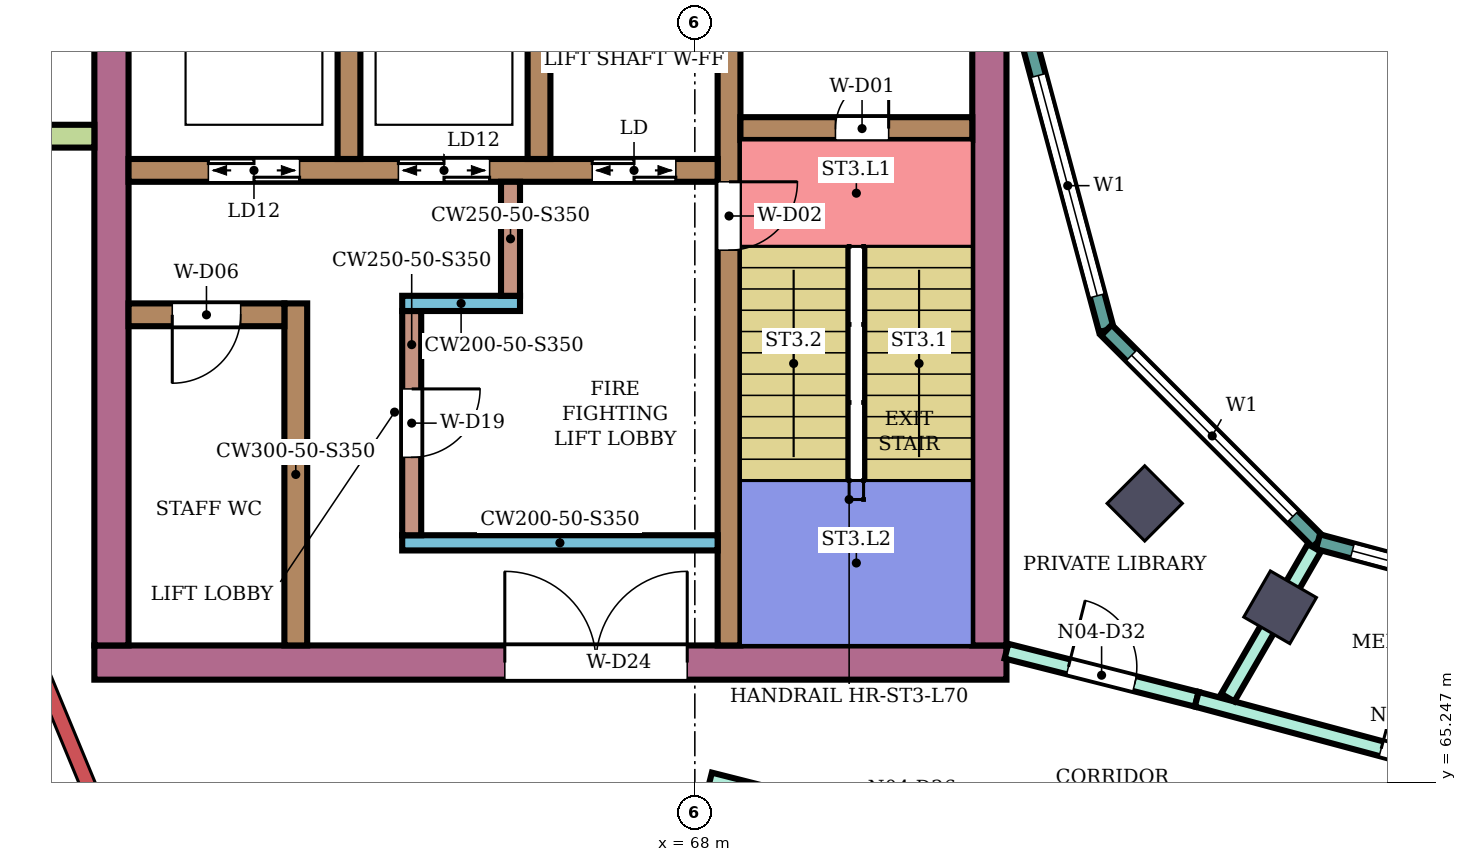
"""IFC4 building model, lengths in metres.
Left out: names, types, materials, properties, quantities, classifications, styles, units other than length and angle.
Written with IfcOpenShell. Run it as: python <this file> out.ifc"""

import sys

from ifc_helpers import new_model, si_unit, direction, frame, frame_2d, origin, origin_2d, place, context, subcontext, project, spatial, rectangle, extrude, element, fill, save


model = new_model("IFC4")
c1 = context("Model", 3, precision=1e-05, world=origin(), true_north=direction((0.0, 1.0)))
c2 = subcontext(c1, "Body", "Model", "MODEL_VIEW")
j1 = project(units=[si_unit("LENGTHUNIT", "METRE"), si_unit("PLANEANGLEUNIT", "RADIAN")], contexts=[c1])
p1 = place(None, origin())
s1 = spatial("IfcSite", under=j1, at=p1, CompositionType="ELEMENT")
p2 = place(p1, origin())
s2 = spatial("IfcBuilding", under=s1, at=p2, CompositionType="ELEMENT")
p3 = place(p2, frame((0.0, 0.0, 305.1)))
s3 = spatial("IfcBuildingStorey", under=s2, at=p3, CompositionType="ELEMENT", Elevation=305.1)
for number, where, z_axis, x_axis in (
    (1, (73.919, 68.919, 0.0), (0.0, 0.0, 1.0), (-0.707, -0.707, 0.0)),
    (2, (75.7, 67.552, 0.0), (0.0, 0.0, 1.0), (-0.5, -0.866, 0.0)),
):
    element("IfcColumn", number, at=place(p3, frame(where, z_axis=z_axis, x_axis=x_axis)), inside=s3, PredefinedType="COLUMN", context=c2, shape_type="SweptSolid", body=[
        extrude(rectangle(XDim=0.7, YDim=0.7, at=origin_2d()), origin(), (0.0, 0.0, 1.0), 4.2),
    ])
p4 = place(p3, frame((72.1, 66.825, 0.0), z_axis=(0.0, 0.0, 1.0), x_axis=(-1.0, 0.0, 0.0)))
e3 = element("IfcWall", 3, at=p4, inside=s3, PredefinedType="SHEAR", context=c2, shape_type="SweptSolid", body=[
    extrude(rectangle(XDim=12.0, YDim=0.45, at=frame_2d((6.0, 0.0))), origin(), (0.0, 0.0, 1.0), 3.85),
])
p5 = place(p4, frame((4.2, 0.0, 0.0)))
e4 = element("IfcOpeningElement", 4, at=p5, cuts=e3, PredefinedType="OPENING", context=c2, shape_type="SweptSolid", body=[
    extrude(rectangle(XDim=2.4, YDim=2.4, at=frame_2d((1.2, 1.2))), frame((0.0, 0.235, 0.0), z_axis=(0.0, -1.0, 0.0), x_axis=(1.0, 0.0, 0.0)), (0.0, 0.0, 1.0), 0.47),
])
p6 = place(p3, frame((71.875, 75.0, 0.0), z_axis=(0.0, 0.0, 1.0), x_axis=(0.0, -1.0, 0.0)))
e5 = element("IfcWall", 5, at=p6, inside=s3, PredefinedType="SHEAR", context=c2, shape_type="SweptSolid", body=[
    extrude(rectangle(XDim=7.95, YDim=0.45, at=frame_2d((3.975, 0.0))), origin(), (0.0, 0.0, 1.0), 3.85),
])
p7 = place(p3, frame((60.325, 76.4, 0.0), z_axis=(0.0, 0.0, 1.0), x_axis=(0.0, -1.0, 0.0)))
e6 = element("IfcWall", 6, at=p7, inside=s3, PredefinedType="SHEAR", context=c2, shape_type="SweptSolid", body=[
    extrude(rectangle(XDim=9.35, YDim=0.45, at=frame_2d((4.675, 0.0))), origin(), (0.0, 0.0, 1.0), 3.85),
])
p8 = place(p3, frame((68.45, 75.0, 0.0), z_axis=(0.0, 0.0, 1.0), x_axis=(0.0, -1.0, 0.0)))
e7 = element("IfcWall", 7, at=p8, inside=s3, PredefinedType="SHEAR", context=c2, shape_type="SweptSolid", body=[
    extrude(rectangle(XDim=7.95, YDim=0.3, at=frame_2d((3.975, 0.0))), origin(), (0.0, 0.0, 1.0), 3.85),
])
p9 = place(p8, frame((1.85, 0.0, 0.0)))
e8 = element("IfcOpeningElement", 8, at=p9, cuts=e7, PredefinedType="OPENING", context=c2, shape_type="SweptSolid", body=[
    extrude(rectangle(XDim=0.9, YDim=2.1, at=frame_2d((0.45, 1.05))), frame((0.0, 0.16, 0.0), z_axis=(0.0, -1.0, 0.0), x_axis=(1.0, 0.0, 0.0)), (0.0, 0.0, 1.0), 0.32),
])
p10 = place(p3, frame((71.65, 73.85, 0.0), z_axis=(0.0, 0.0, 1.0), x_axis=(-1.0, 0.0, 0.0)))
e9 = element("IfcWall", 9, at=p10, inside=s3, PredefinedType="SHEAR", context=c2, shape_type="SweptSolid", body=[
    extrude(rectangle(XDim=3.05, YDim=0.3, at=frame_2d((1.525, 0.0))), origin(), (0.0, 0.0, 1.0), 3.85),
])
p11 = place(p10, frame((1.1, 0.0, 0.0)))
e10 = element("IfcOpeningElement", 10, at=p11, cuts=e9, PredefinedType="OPENING", context=c2, shape_type="SweptSolid", body=[
    extrude(rectangle(XDim=0.7, YDim=2.0, at=frame_2d((0.35, 1.0))), frame((0.0, 0.16, 0.0), z_axis=(0.0, -1.0, 0.0), x_axis=(1.0, 0.0, 0.0)), (0.0, 0.0, 1.0), 0.32),
])
p12 = place(p3, frame((68.3, 73.3, 0.0), z_axis=(0.0, 0.0, 1.0), x_axis=(-1.0, 0.0, 0.0)))
e11 = element("IfcWall", 11, at=p12, inside=s3, PredefinedType="SHEAR", context=c2, shape_type="SweptSolid", body=[
    extrude(rectangle(XDim=7.75, YDim=0.3, at=frame_2d((3.875, 0.0))), origin(), (0.0, 0.0, 1.0), 3.85),
])
p13 = place(p12, frame((0.55, 0.0, 0.0)))
e12 = element("IfcOpeningElement", 12, at=p13, cuts=e11, PredefinedType="OPENING", context=c2, shape_type="SweptSolid", body=[
    extrude(rectangle(XDim=1.1, YDim=2.1, at=frame_2d((0.55, 1.05))), frame((0.0, 0.16, 0.0), z_axis=(0.0, -1.0, 0.0), x_axis=(1.0, 0.0, 0.0)), (0.0, 0.0, 1.0), 0.32),
])
p14 = place(p12, frame((3.0, 0.0, 0.0)))
e13 = element("IfcOpeningElement", 13, at=p14, cuts=e11, PredefinedType="OPENING", context=c2, shape_type="SweptSolid", body=[
    extrude(rectangle(XDim=1.2, YDim=2.1, at=frame_2d((0.6, 1.05))), frame((0.0, 0.16, 0.0), z_axis=(0.0, -1.0, 0.0), x_axis=(1.0, 0.0, 0.0)), (0.0, 0.0, 1.0), 0.32),
])
p15 = place(p12, frame((5.5, 0.0, 0.0)))
e14 = element("IfcOpeningElement", 14, at=p15, cuts=e11, PredefinedType="OPENING", context=c2, shape_type="SweptSolid", body=[
    extrude(rectangle(XDim=1.2, YDim=2.1, at=frame_2d((0.6, 1.05))), frame((0.0, 0.16, 0.0), z_axis=(0.0, -1.0, 0.0), x_axis=(1.0, 0.0, 0.0)), (0.0, 0.0, 1.0), 0.32),
])
for number, where, z_axis, x_axis in (
    (15, (65.95, 76.0, 0.0), (0.0, 0.0, 1.0), (0.0, -1.0, 0.0)),
    (16, (63.45, 76.0, 0.0), (0.0, 0.0, 1.0), (0.0, -1.0, 0.0)),
):
    element("IfcWall", number, at=place(p3, frame(where, z_axis=z_axis, x_axis=x_axis)), inside=s3, PredefinedType="SHEAR", context=c2, shape_type="SweptSolid", body=[
        extrude(rectangle(XDim=2.55, YDim=0.3, at=frame_2d((1.275, 0.0))), origin(), (0.0, 0.0, 1.0), 3.85),
    ])
p16 = place(p3, frame((68.3, 68.4, 0.0), z_axis=(0.0, 0.0, 1.0), x_axis=(-1.0, 0.0, 0.0)))
e17 = element("IfcWall", 17, at=p16, inside=s3, PredefinedType="SHEAR", context=c2, shape_type="SweptSolid", body=[
    extrude(rectangle(XDim=4.15, YDim=0.2, at=frame_2d((2.075, 0.0))), origin(), (0.0, 0.0, 1.0), 3.85),
])
p17 = place(p3, frame((64.275, 71.45, 0.0), z_axis=(0.0, 0.0, 1.0), x_axis=(0.0, -1.0, 0.0)))
e18 = element("IfcWall", 18, at=p17, inside=s3, PredefinedType="SHEAR", context=c2, shape_type="SweptSolid", body=[
    extrude(rectangle(XDim=2.95, YDim=0.25, at=frame_2d((1.475, 0.0))), origin(), (0.0, 0.0, 1.0), 3.85),
])
p18 = place(p17, frame((1.025, 0.0, 0.0)))
e19 = element("IfcOpeningElement", 19, at=p18, cuts=e18, PredefinedType="OPENING", context=c2, shape_type="SweptSolid", body=[
    extrude(rectangle(XDim=0.9, YDim=2.1, at=frame_2d((0.45, 1.05))), frame((0.0, 0.135, 0.0), z_axis=(0.0, -1.0, 0.0), x_axis=(1.0, 0.0, 0.0)), (0.0, 0.0, 1.0), 0.27),
])
p19 = place(p3, frame((65.7, 71.55, 0.0), z_axis=(0.0, 0.0, 1.0), x_axis=(-1.0, 0.0, 0.0)))
e20 = element("IfcWall", 20, at=p19, inside=s3, PredefinedType="SHEAR", context=c2, shape_type="SweptSolid", body=[
    extrude(rectangle(XDim=1.55, YDim=0.2, at=frame_2d((0.775, 0.0))), origin(), (0.0, 0.0, 1.0), 3.85),
])
p20 = place(p3, frame((65.575, 73.15, 0.0), z_axis=(0.0, 0.0, 1.0), x_axis=(0.0, -1.0, 0.0)))
e21 = element("IfcWall", 21, at=p20, inside=s3, PredefinedType="SHEAR", context=c2, shape_type="SweptSolid", body=[
    extrude(rectangle(XDim=1.5, YDim=0.25, at=frame_2d((0.75, 0.0))), origin(), (0.0, 0.0, 1.0), 3.85),
])
p21 = place(p3, frame((62.75, 71.55, 0.0), z_axis=(0.0, 0.0, 1.0), x_axis=(0.0, -1.0, 0.0)))
e22 = element("IfcWall", 22, at=p21, inside=s3, PredefinedType="SHEAR", context=c2, shape_type="SweptSolid", body=[
    extrude(rectangle(XDim=4.5, YDim=0.3, at=frame_2d((2.25, 0.0))), origin(), (0.0, 0.0, 1.0), 3.85),
])
p22 = place(p3, frame((62.6, 71.4, 0.0), z_axis=(0.0, 0.0, 1.0), x_axis=(-1.0, 0.0, 0.0)))
e23 = element("IfcWall", 23, at=p22, inside=s3, PredefinedType="SHEAR", context=c2, shape_type="SweptSolid", body=[
    extrude(rectangle(XDim=2.05, YDim=0.3, at=frame_2d((1.025, 0.0))), origin(), (0.0, 0.0, 1.0), 3.85),
])
p23 = place(p22, frame((0.575, 0.0, 0.0)))
e24 = element("IfcOpeningElement", 24, at=p23, cuts=e23, PredefinedType="OPENING", context=c2, shape_type="SweptSolid", body=[
    extrude(rectangle(XDim=0.9, YDim=2.1, at=frame_2d((0.45, 1.05))), frame((0.0, 0.16, 0.0), z_axis=(0.0, -1.0, 0.0), x_axis=(1.0, 0.0, 0.0)), (0.0, 0.0, 1.0), 0.32),
])
p24 = place(p3, frame((60.1, 73.75, 0.0), z_axis=(0.0, 0.0, 1.0), x_axis=(-1.0, 0.0, 0.0)))
e25 = element("IfcWall", 25, at=p24, inside=s3, PredefinedType="NOTDEFINED", context=c2, shape_type="SweptSolid", body=[
    extrude(rectangle(XDim=2.416, YDim=0.3, at=frame_2d((1.208, 0.0))), origin(), (0.0, 0.0, 1.0), 4.2),
])
p25 = place(p3, frame((72.396, 75.0, 0.0), z_axis=(0.0, 0.0, 1.0), x_axis=(0.258789828301, -0.965933654434, 0.0)))
e26 = element("IfcWall", 26, at=p25, inside=s3, PredefinedType="NOTDEFINED", context=c2, shape_type="SweptSolid", body=[
    extrude(rectangle(XDim=3.936, YDim=0.2, at=frame_2d((1.968, 0.0))), origin(), (0.0, 0.0, 1.0), 4.2),
])
p26 = place(p25, frame((0.468, 0.0, 0.9)))
e27 = element("IfcOpeningElement", 27, at=p26, cuts=e26, PredefinedType="OPENING", context=c2, shape_type="SweptSolid", body=[
    extrude(rectangle(XDim=3.0, YDim=2.3, at=frame_2d((1.5, 1.15))), frame((0.0, 0.11, 0.0), z_axis=(0.0, -1.0, 0.0), x_axis=(1.0, 0.0, 0.0)), (0.0, 0.0, 1.0), 0.22),
])
p27 = place(p3, frame((73.415, 71.198, 0.0), z_axis=(0.0, 0.0, 1.0), x_axis=(0.707106781187, -0.707106781187, 0.0)))
e28 = element("IfcWall", 28, at=p27, inside=s3, PredefinedType="NOTDEFINED", context=c2, shape_type="SweptSolid", body=[
    extrude(rectangle(XDim=3.936, YDim=0.2, at=frame_2d((1.968, 0.0))), origin(), (0.0, 0.0, 1.0), 4.2),
])
p28 = place(p27, frame((0.468, 0.0, 0.9)))
e29 = element("IfcOpeningElement", 29, at=p28, cuts=e28, PredefinedType="OPENING", context=c2, shape_type="SweptSolid", body=[
    extrude(rectangle(XDim=3.0, YDim=2.3, at=frame_2d((1.5, 1.15))), frame((0.0, 0.11, 0.0), z_axis=(0.0, -1.0, 0.0), x_axis=(1.0, 0.0, 0.0)), (0.0, 0.0, 1.0), 0.22),
])
p29 = place(p3, frame((76.198, 68.415, 0.0), z_axis=(0.0, 0.0, 1.0), x_axis=(0.965933654434, -0.258789828301, 0.0)))
e30 = element("IfcWall", 30, at=p29, inside=s3, PredefinedType="NOTDEFINED", context=c2, shape_type="SweptSolid", body=[
    extrude(rectangle(XDim=3.936, YDim=0.2, at=frame_2d((1.968, 0.0))), origin(), (0.0, 0.0, 1.0), 4.2),
])
p30 = place(p29, frame((0.468, 0.0, 0.9)))
e31 = element("IfcOpeningElement", 31, at=p30, cuts=e30, PredefinedType="OPENING", context=c2, shape_type="SweptSolid", body=[
    extrude(rectangle(XDim=3.0, YDim=2.3, at=frame_2d((1.5, 1.15))), frame((0.0, 0.11, 0.0), z_axis=(0.0, -1.0, 0.0), x_axis=(1.0, 0.0, 0.0)), (0.0, 0.0, 1.0), 0.22),
])
p31 = place(p3, frame((68.2, 65.28, 0.0), z_axis=(0.0, 0.0, 1.0), x_axis=(0.969450596516, -0.245286650503, 0.0)))
e32 = element("IfcWall", 32, at=p31, inside=s3, PredefinedType="PARTITIONING", context=c2, shape_type="SweptSolid", body=[
    extrude(rectangle(XDim=5.928, YDim=0.2, at=frame_2d((2.964, 0.0))), origin(), (0.0, 0.0, 1.0), 3.75),
])
p32 = place(p31, frame((2.24, 0.0, 0.0)))
e33 = element("IfcOpeningElement", 33, at=p32, cuts=e32, PredefinedType="OPENING", context=c2, shape_type="SweptSolid", body=[
    extrude(rectangle(XDim=1.0, YDim=2.1, at=frame_2d((0.5, 1.05))), frame((0.0, 0.11, 0.0), z_axis=(0.0, -1.0, 0.0), x_axis=(1.0, 0.0, 0.0)), (0.0, 0.0, 1.0), 0.22),
])
p33 = place(p3, frame((72.1, 66.975, 0.0), z_axis=(0.0, 0.0, 1.0), x_axis=(0.969471314457, -0.245204752086, 0.0)))
e34 = element("IfcWall", 34, at=p33, inside=s3, PredefinedType="PARTITIONING", context=c2, shape_type="SweptSolid", body=[
    extrude(rectangle(XDim=2.582, YDim=0.2, at=frame_2d((1.291, 0.0))), origin(), (0.0, 0.0, 1.0), 3.75),
])
p34 = place(p33, frame((0.841, 0.0, 0.0)))
e35 = element("IfcOpeningElement", 35, at=p34, cuts=e34, PredefinedType="OPENING", context=c2, shape_type="SweptSolid", body=[
    extrude(rectangle(XDim=0.9, YDim=2.1, at=frame_2d((0.45, 1.05))), frame((0.0, 0.11, 0.0), z_axis=(0.0, -1.0, 0.0), x_axis=(1.0, 0.0, 0.0)), (0.0, 0.0, 1.0), 0.22),
])
p35 = place(p3, frame((74.603, 66.342, 0.0), z_axis=(0.0, 0.0, 1.0), x_axis=(0.965920893652, -0.258837453254, 0.0)))
e36 = element("IfcWall", 36, at=p35, inside=s3, PredefinedType="PARTITIONING", context=c2, shape_type="SweptSolid", body=[
    extrude(rectangle(XDim=5.458, YDim=0.2, at=frame_2d((2.729, 0.0))), origin(), (0.0, 0.0, 1.0), 3.75),
])
p36 = place(p35, frame((2.512, 0.0, 0.0)))
e37 = element("IfcOpeningElement", 37, at=p36, cuts=e36, PredefinedType="OPENING", context=c2, shape_type="SweptSolid", body=[
    extrude(rectangle(XDim=0.9, YDim=2.1, at=frame_2d((0.45, 1.05))), frame((0.0, 0.11, 0.0), z_axis=(0.0, -1.0, 0.0), x_axis=(1.0, 0.0, 0.0)), (0.0, 0.0, 1.0), 0.22),
])
p37 = place(p3, frame((75.012, 66.363, 0.0), z_axis=(0.0, 0.0, 1.0), x_axis=(0.500223967704, 0.86589605735, 0.0)))
e38 = element("IfcWall", 38, at=p37, inside=s3, PredefinedType="PARTITIONING", context=c2, shape_type="SweptSolid", body=[
    extrude(rectangle(XDim=2.275, YDim=0.2, at=frame_2d((1.138, 0.0))), origin(), (0.0, 0.0, 1.0), 3.75),
])
p38 = place(p26, origin())
e39 = element("IfcWindow", 39, at=p38, inside=s3, PartitioningType="SINGLE_PANEL", PredefinedType="WINDOW", context=c2, shape_type="SweptSolid", body=[
    extrude(rectangle(XDim=3.0, YDim=2.3, at=frame_2d((1.5, 1.15))), frame((0.0, 0.03, 0.0), z_axis=(0.0, -1.0, 0.0), x_axis=(1.0, 0.0, 0.0)), (0.0, 0.0, 1.0), 0.06),
])
fill(e27, e39)
p39 = place(p28, origin())
e40 = element("IfcWindow", 40, at=p39, inside=s3, PartitioningType="SINGLE_PANEL", PredefinedType="WINDOW", context=c2, shape_type="SweptSolid", body=[
    extrude(rectangle(XDim=3.0, YDim=2.3, at=frame_2d((1.5, 1.15))), frame((0.0, 0.03, 0.0), z_axis=(0.0, -1.0, 0.0), x_axis=(1.0, 0.0, 0.0)), (0.0, 0.0, 1.0), 0.06),
])
fill(e29, e40)
p40 = place(p30, origin())
e41 = element("IfcWindow", 41, at=p40, inside=s3, PartitioningType="SINGLE_PANEL", PredefinedType="WINDOW", context=c2, shape_type="SweptSolid", body=[
    extrude(rectangle(XDim=3.0, YDim=2.3, at=frame_2d((1.5, 1.15))), frame((0.0, 0.03, 0.0), z_axis=(0.0, -1.0, 0.0), x_axis=(1.0, 0.0, 0.0)), (0.0, 0.0, 1.0), 0.06),
])
fill(e31, e41)
p41 = place(p36, origin())
e42 = element("IfcDoor", 42, at=p41, inside=s3, OperationType="SINGLE_SWING_LEFT", PredefinedType="DOOR", context=c2, shape_type="SweptSolid", body=[
    extrude(rectangle(XDim=0.9, YDim=2.1, at=frame_2d((0.45, 1.05))), frame((0.0, 0.025, 0.0), z_axis=(0.0, -1.0, 0.0), x_axis=(1.0, 0.0, 0.0)), (0.0, 0.0, 1.0), 0.05),
])
fill(e37, e42)
p42 = place(p34, origin())
e43 = element("IfcDoor", 43, at=p42, inside=s3, OperationType="SINGLE_SWING_LEFT", PredefinedType="DOOR", context=c2, shape_type="SweptSolid", body=[
    extrude(rectangle(XDim=0.9, YDim=2.1, at=frame_2d((0.45, 1.05))), frame((0.0, 0.025, 0.0), z_axis=(0.0, -1.0, 0.0), x_axis=(1.0, 0.0, 0.0)), (0.0, 0.0, 1.0), 0.05),
])
fill(e35, e43)
p43 = place(p11, frame((0.7, 0.0, 0.0), z_axis=(0.0, 0.0, 1.0), x_axis=(-1.0, 0.0, 0.0)))
e44 = element("IfcDoor", 44, at=p43, inside=s3, OperationType="SINGLE_SWING_RIGHT", PredefinedType="DOOR", context=c2, shape_type="SweptSolid", body=[
    extrude(rectangle(XDim=0.7, YDim=2.0, at=frame_2d((0.35, 1.0))), frame((0.0, 0.025, 0.0), z_axis=(0.0, -1.0, 0.0), x_axis=(1.0, 0.0, 0.0)), (0.0, 0.0, 1.0), 0.05),
])
fill(e10, e44)
p44 = place(p9, origin())
e45 = element("IfcDoor", 45, at=p44, inside=s3, OperationType="SINGLE_SWING_LEFT", PredefinedType="DOOR", context=c2, shape_type="SweptSolid", body=[
    extrude(rectangle(XDim=0.9, YDim=2.1, at=frame_2d((0.45, 1.05))), frame((0.0, 0.025, 0.0), z_axis=(0.0, -1.0, 0.0), x_axis=(1.0, 0.0, 0.0)), (0.0, 0.0, 1.0), 0.05),
])
fill(e8, e45)
p45 = place(p13, origin())
e46 = element("IfcDoor", 46, at=p45, inside=s3, OperationType="DOUBLE_DOOR_SLIDING", PredefinedType="DOOR", context=c2, shape_type="SweptSolid", body=[
    extrude(rectangle(XDim=1.1, YDim=2.1, at=frame_2d((0.55, 1.05))), frame((0.0, 0.025, 0.0), z_axis=(0.0, -1.0, 0.0), x_axis=(1.0, 0.0, 0.0)), (0.0, 0.0, 1.0), 0.05),
])
fill(e12, e46)
p46 = place(p14, origin())
e47 = element("IfcDoor", 47, at=p46, inside=s3, OperationType="DOUBLE_DOOR_SLIDING", PredefinedType="DOOR", context=c2, shape_type="SweptSolid", body=[
    extrude(rectangle(XDim=1.2, YDim=2.1, at=frame_2d((0.6, 1.05))), frame((0.0, 0.025, 0.0), z_axis=(0.0, -1.0, 0.0), x_axis=(1.0, 0.0, 0.0)), (0.0, 0.0, 1.0), 0.05),
])
fill(e13, e47)
p47 = place(p15, origin())
e48 = element("IfcDoor", 48, at=p47, inside=s3, OperationType="DOUBLE_DOOR_SLIDING", PredefinedType="DOOR", context=c2, shape_type="SweptSolid", body=[
    extrude(rectangle(XDim=1.2, YDim=2.1, at=frame_2d((0.6, 1.05))), frame((0.0, 0.025, 0.0), z_axis=(0.0, -1.0, 0.0), x_axis=(1.0, 0.0, 0.0)), (0.0, 0.0, 1.0), 0.05),
])
fill(e14, e48)
p48 = place(p18, origin())
e49 = element("IfcDoor", 49, at=p48, inside=s3, OperationType="SINGLE_SWING_LEFT", PredefinedType="DOOR", context=c2, shape_type="SweptSolid", body=[
    extrude(rectangle(XDim=0.9, YDim=2.1, at=frame_2d((0.45, 1.05))), frame((0.0, 0.025, 0.0), z_axis=(0.0, -1.0, 0.0), x_axis=(1.0, 0.0, 0.0)), (0.0, 0.0, 1.0), 0.05),
])
fill(e19, e49)
p49 = place(p23, origin())
e50 = element("IfcDoor", 50, at=p49, inside=s3, OperationType="SINGLE_SWING_RIGHT", PredefinedType="DOOR", context=c2, shape_type="SweptSolid", body=[
    extrude(rectangle(XDim=0.9, YDim=2.1, at=frame_2d((0.45, 1.05))), frame((0.0, 0.025, 0.0), z_axis=(0.0, -1.0, 0.0), x_axis=(1.0, 0.0, 0.0)), (0.0, 0.0, 1.0), 0.05),
])
fill(e24, e50)
p50 = place(p5, frame((2.4, 0.0, 0.0), z_axis=(0.0, 0.0, 1.0), x_axis=(-1.0, 0.0, 0.0)))
e51 = element("IfcDoor", 51, at=p50, inside=s3, OperationType="DOUBLE_DOOR_SINGLE_SWING", PredefinedType="DOOR", context=c2, shape_type="SweptSolid", body=[
    extrude(rectangle(XDim=2.4, YDim=2.4, at=frame_2d((1.2, 1.2))), frame((0.0, 0.025, 0.0), z_axis=(0.0, -1.0, 0.0), x_axis=(1.0, 0.0, 0.0)), (0.0, 0.0, 1.0), 0.05),
])
fill(e4, e51)
save(model, sys.argv[1])
